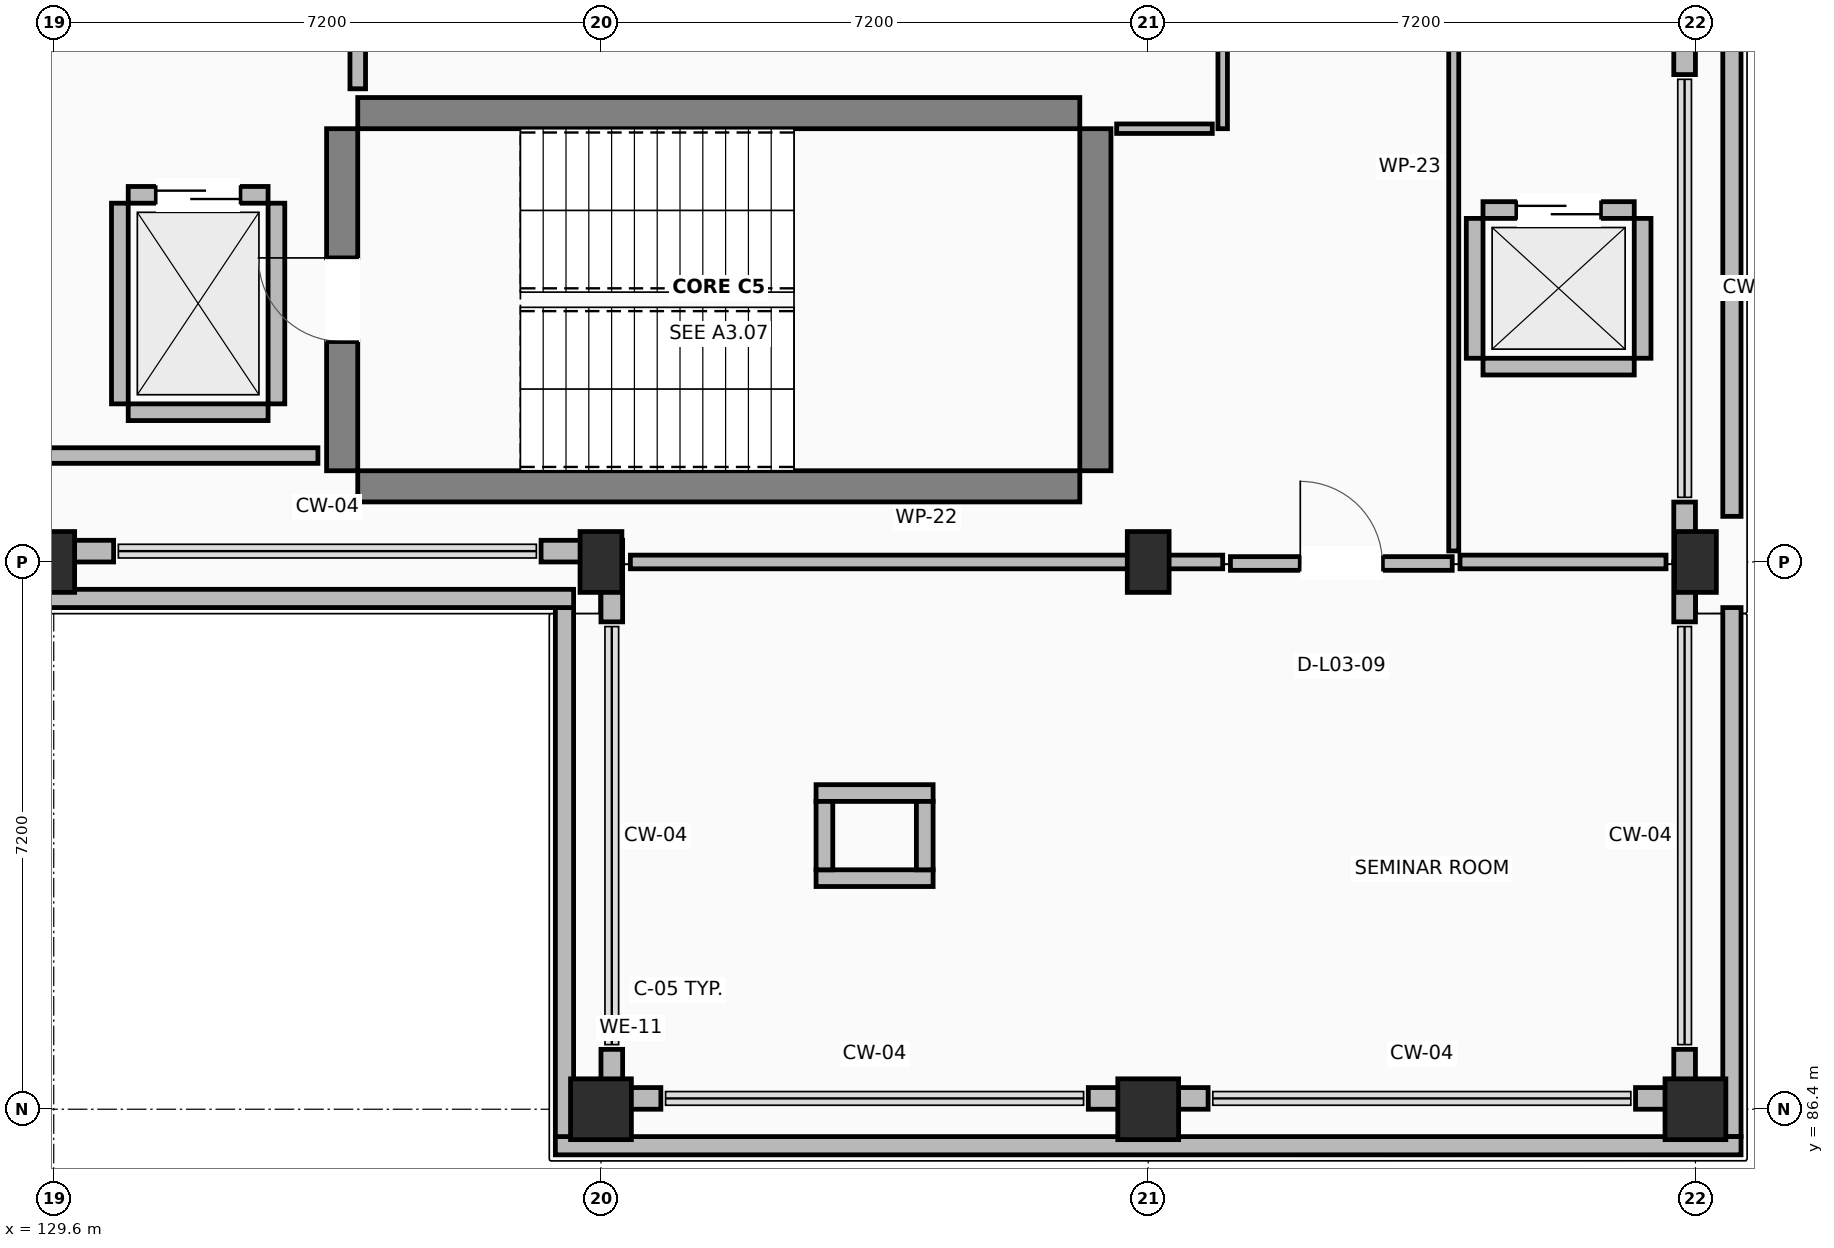
"""IFC4 building model, lengths in metres.
Left out: names, types, materials, properties, quantities, classifications, styles, units other than length and angle.
Written with IfcOpenShell. Run it as: python <this file> out.ifc"""

import sys

from ifc_helpers import new_model, si_unit, direction, frame, frame_2d, origin, origin_2d, place, context, subcontext, project, spatial, rectangle, extrude, element, fill, save


model = new_model("IFC4")
c1 = context("Model", 3, precision=1e-05, world=origin(), true_north=direction((0.0, 1.0)))
c2 = subcontext(c1, "Body", "Model", "MODEL_VIEW")
j1 = project(units=[si_unit("LENGTHUNIT", "METRE"), si_unit("PLANEANGLEUNIT", "RADIAN")], contexts=[c1])
p1 = place(None, origin())
s1 = spatial("IfcSite", under=j1, at=p1, CompositionType="ELEMENT")
p2 = place(p1, origin())
s2 = spatial("IfcBuilding", under=s1, at=p2, CompositionType="ELEMENT")
p3 = place(p2, frame((0.0, 0.0, 13.5)))
s3 = spatial("IfcBuildingStorey", under=s2, at=p3, CompositionType="ELEMENT", Elevation=13.5)
p4 = place(p3, frame((129.6, 93.6, 0.0), z_axis=(0.0, 0.0, 1.0), x_axis=(1.0, 0.0, 0.0)))
e1 = element("IfcColumn", 1, at=p4, inside=s3, PredefinedType="COLUMN", context=c2, shape_type="SweptSolid", body=[
    extrude(rectangle(XDim=0.55, YDim=0.8, at=origin_2d()), origin(), (0.0, 0.0, 1.0), 4.22),
])
p5 = place(p3, frame((136.8, 86.4, 0.0), z_axis=(0.0, 0.0, 1.0), x_axis=(1.0, 0.0, 0.0)))
e2 = element("IfcColumn", 2, at=p5, inside=s3, PredefinedType="COLUMN", context=c2, shape_type="SweptSolid", body=[
    extrude(rectangle(XDim=0.8, YDim=0.8, at=origin_2d()), origin(), (0.0, 0.0, 1.0), 4.22),
])
p6 = place(p3, frame((136.8, 93.6, 0.0), z_axis=(0.0, 0.0, 1.0), x_axis=(1.0, 0.0, 0.0)))
e3 = element("IfcColumn", 3, at=p6, inside=s3, PredefinedType="COLUMN", context=c2, shape_type="SweptSolid", body=[
    extrude(rectangle(XDim=0.55, YDim=0.8, at=origin_2d()), origin(), (0.0, 0.0, 1.0), 4.22),
])
p7 = place(p3, frame((144.0, 86.4, 0.0), z_axis=(0.0, 0.0, 1.0), x_axis=(1.0, 0.0, 0.0)))
e4 = element("IfcColumn", 4, at=p7, inside=s3, PredefinedType="COLUMN", context=c2, shape_type="SweptSolid", body=[
    extrude(rectangle(XDim=0.8, YDim=0.8, at=origin_2d()), origin(), (0.0, 0.0, 1.0), 4.22),
])
p8 = place(p3, frame((144.0, 93.6, 0.0), z_axis=(0.0, 0.0, 1.0), x_axis=(1.0, 0.0, 0.0)))
e5 = element("IfcColumn", 5, at=p8, inside=s3, PredefinedType="COLUMN", context=c2, shape_type="SweptSolid", body=[
    extrude(rectangle(XDim=0.55, YDim=0.8, at=origin_2d()), origin(), (0.0, 0.0, 1.0), 4.22),
])
p9 = place(p3, frame((151.2, 86.4, 0.0), z_axis=(0.0, 0.0, 1.0), x_axis=(1.0, 0.0, 0.0)))
e6 = element("IfcColumn", 6, at=p9, inside=s3, PredefinedType="COLUMN", context=c2, shape_type="SweptSolid", body=[
    extrude(rectangle(XDim=0.8, YDim=0.8, at=origin_2d()), origin(), (0.0, 0.0, 1.0), 4.22),
])
p10 = place(p3, frame((151.2, 93.6, 0.0), z_axis=(0.0, 0.0, 1.0), x_axis=(1.0, 0.0, 0.0)))
e7 = element("IfcColumn", 7, at=p10, inside=s3, PredefinedType="COLUMN", context=c2, shape_type="SweptSolid", body=[
    extrude(rectangle(XDim=0.55, YDim=0.8, at=origin_2d()), origin(), (0.0, 0.0, 1.0), 4.22),
])
for number, where, z_axis, x_axis in (
    (8, (133.6, 94.595, 0.0), (0.0, 0.0, 1.0), (1.0, 0.0, 0.0)),
    (9, (133.6, 99.505, 0.0), (0.0, 0.0, 1.0), (1.0, 0.0, 0.0)),
):
    element("IfcWall", number, at=place(p3, frame(where, z_axis=z_axis, x_axis=x_axis)), inside=s3, PredefinedType="SHEAR", context=c2, shape_type="SweptSolid", body=[
        extrude(rectangle(XDim=9.5, YDim=0.41, at=frame_2d((4.75, 0.0))), origin(), (0.0, 0.0, 1.0), 4.22),
    ])
p11 = place(p3, frame((133.395, 94.8, 0.0), z_axis=(0.0, 0.0, 1.0), x_axis=(0.0, 1.0, 0.0)))
e10 = element("IfcWall", 10, at=p11, inside=s3, PredefinedType="SHEAR", context=c2, shape_type="SweptSolid", body=[
    extrude(rectangle(XDim=4.5, YDim=0.41, at=frame_2d((2.25, 0.0))), origin(), (0.0, 0.0, 1.0), 4.22),
])
p12 = place(p11, frame((1.7, 0.0, 0.0)))
e11 = element("IfcOpeningElement", 11, at=p12, cuts=e10, PredefinedType="OPENING", context=c2, shape_type="SweptSolid", body=[
    extrude(rectangle(XDim=1.1, YDim=2.15, at=frame_2d((0.55, 1.075))), frame((0.0, 0.215, 0.0), z_axis=(0.0, -1.0, 0.0), x_axis=(1.0, 0.0, 0.0)), (0.0, 0.0, 1.0), 0.43),
])
p13 = place(p3, frame((143.305, 94.8, 0.0), z_axis=(0.0, 0.0, 1.0), x_axis=(0.0, 1.0, 0.0)))
e12 = element("IfcWall", 12, at=p13, inside=s3, PredefinedType="SHEAR", context=c2, shape_type="SweptSolid", body=[
    extrude(rectangle(XDim=4.5, YDim=0.41, at=frame_2d((2.25, 0.0))), origin(), (0.0, 0.0, 1.0), 4.22),
])
p14 = place(p3, frame((136.8, 86.542, 0.0), z_axis=(0.0, 0.0, 1.0), x_axis=(1.0, 0.0, 0.0)))
e13 = element("IfcWall", 13, at=p14, inside=s3, PredefinedType="STANDARD", context=c2, shape_type="SweptSolid", body=[
    extrude(rectangle(XDim=0.788, YDim=0.285, at=frame_2d((0.394, 0.0))), origin(), (0.0, 0.0, 1.0), 3.26),
])
p15 = place(p3, frame((143.212, 86.542, 0.0), z_axis=(0.0, 0.0, 1.0), x_axis=(1.0, 0.0, 0.0)))
e14 = element("IfcWall", 14, at=p15, inside=s3, PredefinedType="STANDARD", context=c2, shape_type="SweptSolid", body=[
    extrude(rectangle(XDim=1.576, YDim=0.285, at=frame_2d((0.788, 0.0))), origin(), (0.0, 0.0, 1.0), 3.26),
])
p16 = place(p3, frame((150.412, 86.542, 0.0), z_axis=(0.0, 0.0, 1.0), x_axis=(1.0, 0.0, 0.0)))
e15 = element("IfcWall", 15, at=p16, inside=s3, PredefinedType="STANDARD", context=c2, shape_type="SweptSolid", body=[
    extrude(rectangle(XDim=0.788, YDim=0.285, at=frame_2d((0.394, 0.0))), origin(), (0.0, 0.0, 1.0), 3.26),
])
p17 = place(p3, frame((151.058, 86.685, 0.0), z_axis=(0.0, 0.0, 1.0), x_axis=(0.0, 1.0, 0.0)))
e16 = element("IfcWall", 16, at=p17, inside=s3, PredefinedType="STANDARD", context=c2, shape_type="SweptSolid", body=[
    extrude(rectangle(XDim=0.503, YDim=0.285, at=frame_2d((0.251, 0.0))), origin(), (0.0, 0.0, 1.0), 3.26),
])
p18 = place(p3, frame((151.058, 92.812, 0.0), z_axis=(0.0, 0.0, 1.0), x_axis=(0.0, 1.0, 0.0)))
e17 = element("IfcWall", 17, at=p18, inside=s3, PredefinedType="STANDARD", context=c2, shape_type="SweptSolid", body=[
    extrude(rectangle(XDim=0.788, YDim=0.285, at=frame_2d((0.394, 0.0))), origin(), (0.0, 0.0, 1.0), 3.26),
])
p19 = place(p3, frame((151.058, 93.6, 0.0), z_axis=(0.0, 0.0, 1.0), x_axis=(0.0, 1.0, 0.0)))
e18 = element("IfcWall", 18, at=p19, inside=s3, PredefinedType="STANDARD", context=c2, shape_type="SweptSolid", body=[
    extrude(rectangle(XDim=0.788, YDim=0.285, at=frame_2d((0.394, 0.0))), origin(), (0.0, 0.0, 1.0), 3.26),
])
for number, where, z_axis, x_axis in (
    (19, (151.058, 100.012, 0.0), (0.0, 0.0, 1.0), (0.0, 1.0, 0.0)),
    (20, (128.812, 93.742, 0.0), (0.0, 0.0, 1.0), (1.0, 0.0, 0.0)),
):
    element("IfcWall", number, at=place(p3, frame(where, z_axis=z_axis, x_axis=x_axis)), inside=s3, PredefinedType="STANDARD", context=c2, shape_type="SweptSolid", body=[
        extrude(rectangle(XDim=1.576, YDim=0.285, at=frame_2d((0.788, 0.0))), origin(), (0.0, 0.0, 1.0), 3.26),
    ])
p20 = place(p3, frame((136.012, 93.742, 0.0), z_axis=(0.0, 0.0, 1.0), x_axis=(1.0, 0.0, 0.0)))
e21 = element("IfcWall", 21, at=p20, inside=s3, PredefinedType="STANDARD", context=c2, shape_type="SweptSolid", body=[
    extrude(rectangle(XDim=0.788, YDim=0.285, at=frame_2d((0.394, 0.0))), origin(), (0.0, 0.0, 1.0), 3.26),
])
p21 = place(p3, frame((136.942, 93.885, 0.0), z_axis=(0.0, 0.0, 1.0), x_axis=(0.0, -1.0, 0.0)))
e22 = element("IfcWall", 22, at=p21, inside=s3, PredefinedType="STANDARD", context=c2, shape_type="SweptSolid", body=[
    extrude(rectangle(XDim=1.073, YDim=0.285, at=frame_2d((0.537, 0.0))), origin(), (0.0, 0.0, 1.0), 3.26),
])
p22 = place(p3, frame((136.942, 87.188, 0.0), z_axis=(0.0, 0.0, 1.0), x_axis=(0.0, -1.0, 0.0)))
e23 = element("IfcWall", 23, at=p22, inside=s3, PredefinedType="STANDARD", context=c2, shape_type="SweptSolid", body=[
    extrude(rectangle(XDim=0.503, YDim=0.285, at=frame_2d((0.251, 0.0))), origin(), (0.0, 0.0, 1.0), 3.26),
])
p23 = place(p3, frame((151.68, 115.56, 0.0), z_axis=(0.0, 0.0, 1.0), x_axis=(0.0, -1.0, 0.0)))
e24 = element("IfcWall", 24, at=p23, inside=s3, PredefinedType="PARAPET", context=c2, shape_type="SweptSolid", body=[
    extrude(rectangle(XDim=21.36, YDim=0.24, at=frame_2d((10.68, 0.0))), origin(), (0.0, 0.0, 1.0), 1.12),
])
p24 = place(p3, frame((151.68, 93.0, 0.0), z_axis=(0.0, 0.0, 1.0), x_axis=(0.0, -1.0, 0.0)))
e25 = element("IfcWall", 25, at=p24, inside=s3, PredefinedType="PARAPET", context=c2, shape_type="SweptSolid", body=[
    extrude(rectangle(XDim=6.96, YDim=0.24, at=frame_2d((3.48, 0.0))), origin(), (0.0, 0.0, 1.0), 1.12),
])
p25 = place(p3, frame((151.8, 85.92, 0.0), z_axis=(0.0, 0.0, 1.0), x_axis=(-1.0, 0.0, 0.0)))
e26 = element("IfcWall", 26, at=p25, inside=s3, PredefinedType="PARAPET", context=c2, shape_type="SweptSolid", body=[
    extrude(rectangle(XDim=15.6, YDim=0.24, at=frame_2d((7.8, 0.0))), origin(), (0.0, 0.0, 1.0), 1.12),
])
p26 = place(p3, frame((136.32, 86.04, 0.0), z_axis=(0.0, 0.0, 1.0), x_axis=(0.0, 1.0, 0.0)))
e27 = element("IfcWall", 27, at=p26, inside=s3, PredefinedType="PARAPET", context=c2, shape_type="SweptSolid", body=[
    extrude(rectangle(XDim=6.96, YDim=0.24, at=frame_2d((3.48, 0.0))), origin(), (0.0, 0.0, 1.0), 1.12),
])
p27 = place(p3, frame((136.44, 93.12, 0.0), z_axis=(0.0, 0.0, 1.0), x_axis=(-1.0, 0.0, 0.0)))
e28 = element("IfcWall", 28, at=p27, inside=s3, PredefinedType="PARAPET", context=c2, shape_type="SweptSolid", body=[
    extrude(rectangle(XDim=57.84, YDim=0.24, at=frame_2d((28.92, 0.0))), origin(), (0.0, 0.0, 1.0), 1.12),
])
p28 = place(p3, frame((130.58, 95.57, 0.0), z_axis=(0.0, 0.0, 1.0), x_axis=(1.0, 0.0, 0.0)))
e29 = element("IfcWall", 29, at=p28, inside=s3, PredefinedType="STANDARD", context=c2, shape_type="SweptSolid", body=[
    extrude(rectangle(XDim=1.84, YDim=0.22, at=frame_2d((0.92, 0.0))), origin(), (0.0, 0.0, 1.0), 3.26),
])
p29 = place(p3, frame((130.58, 98.43, 0.0), z_axis=(0.0, 0.0, 1.0), x_axis=(1.0, 0.0, 0.0)))
e30 = element("IfcWall", 30, at=p29, inside=s3, PredefinedType="STANDARD", context=c2, shape_type="SweptSolid", body=[
    extrude(rectangle(XDim=1.84, YDim=0.22, at=frame_2d((0.92, 0.0))), origin(), (0.0, 0.0, 1.0), 3.26),
])
p30 = place(p29, frame((0.37, 0.0, 0.0)))
e31 = element("IfcOpeningElement", 31, at=p30, cuts=e30, PredefinedType="OPENING", context=c2, shape_type="SweptSolid", body=[
    extrude(rectangle(XDim=1.1, YDim=2.15, at=frame_2d((0.55, 1.075))), frame((0.0, 0.12, 0.0), z_axis=(0.0, -1.0, 0.0), x_axis=(1.0, 0.0, 0.0)), (0.0, 0.0, 1.0), 0.24),
])
for number, where, z_axis, x_axis in (
    (32, (130.47, 95.68, 0.0), (0.0, 0.0, 1.0), (0.0, 1.0, 0.0)),
    (33, (132.53, 95.68, 0.0), (0.0, 0.0, 1.0), (0.0, 1.0, 0.0)),
):
    element("IfcWall", number, at=place(p3, frame(where, z_axis=z_axis, x_axis=x_axis)), inside=s3, PredefinedType="STANDARD", context=c2, shape_type="SweptSolid", body=[
        extrude(rectangle(XDim=2.64, YDim=0.22, at=frame_2d((1.32, 0.0))), origin(), (0.0, 0.0, 1.0), 3.26),
    ])
p31 = place(p3, frame((148.405, 96.17, 0.0), z_axis=(0.0, 0.0, 1.0), x_axis=(1.0, 0.0, 0.0)))
e34 = element("IfcWall", 34, at=p31, inside=s3, PredefinedType="STANDARD", context=c2, shape_type="SweptSolid", body=[
    extrude(rectangle(XDim=1.99, YDim=0.22, at=frame_2d((0.995, 0.0))), origin(), (0.0, 0.0, 1.0), 3.26),
])
p32 = place(p3, frame((148.405, 98.23, 0.0), z_axis=(0.0, 0.0, 1.0), x_axis=(1.0, 0.0, 0.0)))
e35 = element("IfcWall", 35, at=p32, inside=s3, PredefinedType="STANDARD", context=c2, shape_type="SweptSolid", body=[
    extrude(rectangle(XDim=1.99, YDim=0.22, at=frame_2d((0.995, 0.0))), origin(), (0.0, 0.0, 1.0), 3.26),
])
p33 = place(p32, frame((0.445, 0.0, 0.0)))
e36 = element("IfcOpeningElement", 36, at=p33, cuts=e35, PredefinedType="OPENING", context=c2, shape_type="SweptSolid", body=[
    extrude(rectangle(XDim=1.1, YDim=2.15, at=frame_2d((0.55, 1.075))), frame((0.0, 0.12, 0.0), z_axis=(0.0, -1.0, 0.0), x_axis=(1.0, 0.0, 0.0)), (0.0, 0.0, 1.0), 0.24),
])
for number, where, z_axis, x_axis in (
    (37, (148.295, 96.28, 0.0), (0.0, 0.0, 1.0), (0.0, 1.0, 0.0)),
    (38, (150.505, 96.28, 0.0), (0.0, 0.0, 1.0), (0.0, 1.0, 0.0)),
):
    element("IfcWall", number, at=place(p3, frame(where, z_axis=z_axis, x_axis=x_axis)), inside=s3, PredefinedType="STANDARD", context=c2, shape_type="SweptSolid", body=[
        extrude(rectangle(XDim=1.84, YDim=0.22, at=frame_2d((0.92, 0.0))), origin(), (0.0, 0.0, 1.0), 3.26),
    ])
for number, where, z_axis, x_axis in (
    (39, (139.63, 89.44, 0.0), (0.0, 0.0, 1.0), (1.0, 0.0, 0.0)),
    (40, (139.63, 90.56, 0.0), (0.0, 0.0, 1.0), (1.0, 0.0, 0.0)),
):
    element("IfcWall", number, at=place(p3, frame(where, z_axis=z_axis, x_axis=x_axis)), inside=s3, PredefinedType="STANDARD", context=c2, shape_type="SweptSolid", body=[
        extrude(rectangle(XDim=1.54, YDim=0.22, at=frame_2d((0.77, 0.0))), origin(), (0.0, 0.0, 1.0), 3.26),
    ])
for number, where, z_axis, x_axis in (
    (41, (139.74, 89.55, 0.0), (0.0, 0.0, 1.0), (0.0, 1.0, 0.0)),
    (42, (141.06, 89.55, 0.0), (0.0, 0.0, 1.0), (0.0, 1.0, 0.0)),
):
    element("IfcWall", number, at=place(p3, frame(where, z_axis=z_axis, x_axis=x_axis)), inside=s3, PredefinedType="STANDARD", context=c2, shape_type="SweptSolid", body=[
        extrude(rectangle(XDim=0.9, YDim=0.22, at=frame_2d((0.45, 0.0))), origin(), (0.0, 0.0, 1.0), 3.26),
    ])
p34 = place(p3, frame((133.6, 103.783, 0.0), z_axis=(0.0, 0.0, 1.0), x_axis=(0.0, -1.0, 0.0)))
e43 = element("IfcWall", 43, at=p34, inside=s3, PredefinedType="PARTITIONING", context=c2, shape_type="SweptSolid", body=[
    extrude(rectangle(XDim=3.958, YDim=0.205, at=frame_2d((1.979, 0.0))), origin(), (0.0, 0.0, 1.0), 3.26),
])
p35 = place(p3, frame((133.076, 95.0, 0.0), z_axis=(0.0, 0.0, 1.0), x_axis=(-1.0, 0.0, 0.0)))
e44 = element("IfcWall", 44, at=p35, inside=s3, PredefinedType="PARTITIONING", context=c2, shape_type="SweptSolid", body=[
    extrude(rectangle(XDim=3.676, YDim=0.205, at=frame_2d((1.838, 0.0))), origin(), (0.0, 0.0, 1.0), 3.26),
])
p36 = place(p3, frame((137.187, 93.6, 0.0), z_axis=(0.0, 0.0, 1.0), x_axis=(1.0, 0.0, 0.0)))
e45 = element("IfcWall", 45, at=p36, inside=s3, PredefinedType="PARTITIONING", context=c2, shape_type="SweptSolid", body=[
    extrude(rectangle(XDim=7.793, YDim=0.18, at=frame_2d((3.896, 0.0))), origin(), (0.0, 0.0, 1.0), 3.26),
])
p37 = place(p3, frame((145.082, 93.58, 0.0), z_axis=(0.0, 0.0, 1.0), x_axis=(1.0, 0.0, 0.0)))
e46 = element("IfcWall", 46, at=p37, inside=s3, PredefinedType="PARTITIONING", context=c2, shape_type="SweptSolid", body=[
    extrude(rectangle(XDim=2.918, YDim=0.18, at=frame_2d((1.459, 0.0))), origin(), (0.0, 0.0, 1.0), 3.26),
])
p38 = place(p37, frame((0.919, 0.0, 0.0)))
e47 = element("IfcOpeningElement", 47, at=p38, cuts=e46, PredefinedType="OPENING", context=c2, shape_type="SweptSolid", body=[
    extrude(rectangle(XDim=1.08, YDim=2.15, at=frame_2d((0.54, 1.075))), frame((0.0, 0.1, 0.0), z_axis=(0.0, -1.0, 0.0), x_axis=(1.0, 0.0, 0.0)), (0.0, 0.0, 1.0), 0.2),
])
p39 = place(p3, frame((148.102, 93.6, 0.0), z_axis=(0.0, 0.0, 1.0), x_axis=(1.0, 0.0, 0.0)))
e48 = element("IfcWall", 48, at=p39, inside=s3, PredefinedType="PARTITIONING", context=c2, shape_type="SweptSolid", body=[
    extrude(rectangle(XDim=2.711, YDim=0.18, at=frame_2d((1.355, 0.0))), origin(), (0.0, 0.0, 1.0), 3.26),
])
p40 = place(p3, frame((144.98, 103.843, 0.0), z_axis=(0.0, 0.0, 1.0), x_axis=(0.0, -1.0, 0.0)))
e49 = element("IfcWall", 49, at=p40, inside=s3, PredefinedType="PARTITIONING", context=c2, shape_type="SweptSolid", body=[
    extrude(rectangle(XDim=4.543, YDim=0.125, at=frame_2d((2.271, 0.0))), origin(), (0.0, 0.0, 1.0), 3.26),
])
p41 = place(p3, frame((144.843, 99.3, 0.0), z_axis=(0.0, 0.0, 1.0), x_axis=(-1.0, 0.0, 0.0)))
e50 = element("IfcWall", 50, at=p41, inside=s3, PredefinedType="PARTITIONING", context=c2, shape_type="SweptSolid", body=[
    extrude(rectangle(XDim=1.258, YDim=0.125, at=frame_2d((0.629, 0.0))), origin(), (0.0, 0.0, 1.0), 3.26),
])
p42 = place(p3, frame((148.02, 93.745, 0.0), z_axis=(0.0, 0.0, 1.0), x_axis=(0.0, 1.0, 0.0)))
e51 = element("IfcWall", 51, at=p42, inside=s3, PredefinedType="PARTITIONING", context=c2, shape_type="SweptSolid", body=[
    extrude(rectangle(XDim=10.091, YDim=0.132, at=frame_2d((5.045, 0.0))), origin(), (0.0, 0.0, 1.0), 3.26),
])
p43 = place(p12, origin())
e52 = element("IfcDoor", 52, at=p43, inside=s3, OperationType="SINGLE_SWING_RIGHT", PredefinedType="DOOR", context=c2, shape_type="SweptSolid", body=[
    extrude(rectangle(XDim=1.1, YDim=2.15, at=frame_2d((0.55, 1.075))), frame((0.0, 0.025, 0.0), z_axis=(0.0, -1.0, 0.0), x_axis=(1.0, 0.0, 0.0)), (0.0, 0.0, 1.0), 0.05),
])
fill(e11, e52)
p44 = place(p30, origin())
e53 = element("IfcDoor", 53, at=p44, inside=s3, OperationType="SLIDING_TO_RIGHT", PredefinedType="DOOR", context=c2, shape_type="SweptSolid", body=[
    extrude(rectangle(XDim=1.1, YDim=2.15, at=frame_2d((0.55, 1.075))), frame((0.0, 0.025, 0.0), z_axis=(0.0, -1.0, 0.0), x_axis=(1.0, 0.0, 0.0)), (0.0, 0.0, 1.0), 0.05),
])
fill(e31, e53)
p45 = place(p33, origin())
e54 = element("IfcDoor", 54, at=p45, inside=s3, OperationType="SLIDING_TO_RIGHT", PredefinedType="DOOR", context=c2, shape_type="SweptSolid", body=[
    extrude(rectangle(XDim=1.1, YDim=2.15, at=frame_2d((0.55, 1.075))), frame((0.0, 0.025, 0.0), z_axis=(0.0, -1.0, 0.0), x_axis=(1.0, 0.0, 0.0)), (0.0, 0.0, 1.0), 0.05),
])
fill(e36, e54)
p46 = place(p38, origin())
e55 = element("IfcDoor", 55, at=p46, inside=s3, OperationType="SINGLE_SWING_LEFT", PredefinedType="DOOR", context=c2, shape_type="SweptSolid", body=[
    extrude(rectangle(XDim=1.08, YDim=2.15, at=frame_2d((0.54, 1.075))), frame((0.0, 0.025, 0.0), z_axis=(0.0, -1.0, 0.0), x_axis=(1.0, 0.0, 0.0)), (0.0, 0.0, 1.0), 0.05),
])
fill(e47, e55)
save(model, sys.argv[1])
